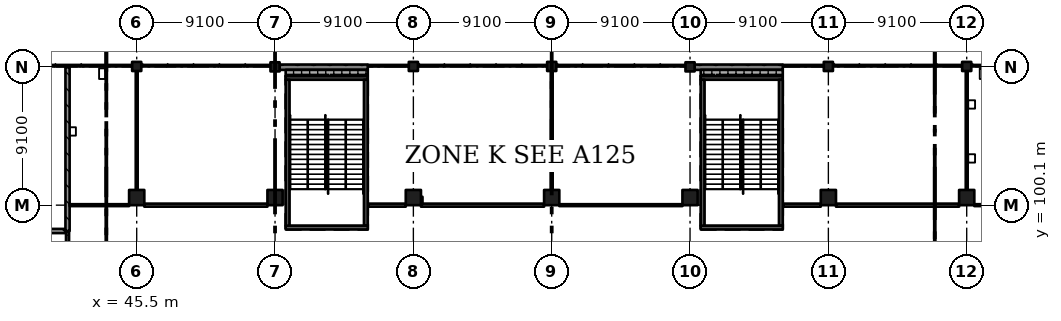
"""IFC4 building model, lengths in metres.
Left out: names, types, materials, properties, quantities, classifications, styles, units other than length and angle.
Written with IfcOpenShell. Run it as: python <this file> out.ifc"""

import sys

from ifc_helpers import new_model, si_unit, direction, frame, frame_2d, origin, origin_2d, place, context, subcontext, project, spatial, rectangle, extrude, element, fill, save


model = new_model("IFC4")
c1 = context("Model", 3, precision=1e-05, world=origin(), true_north=direction((0.0, 1.0)))
c2 = subcontext(c1, "Body", "Model", "MODEL_VIEW")
j1 = project(units=[si_unit("LENGTHUNIT", "METRE"), si_unit("PLANEANGLEUNIT", "RADIAN")], contexts=[c1])
p1 = place(None, origin())
s1 = spatial("IfcSite", under=j1, at=p1, CompositionType="ELEMENT")
p2 = place(p1, origin())
s2 = spatial("IfcBuilding", under=s1, at=p2, CompositionType="ELEMENT")
p3 = place(p2, frame((0.0, 0.0, 6.37)))
s3 = spatial("IfcBuildingStorey", under=s2, at=p3, CompositionType="ELEMENT", Elevation=6.37)
p4 = place(p3, frame((45.5, 100.6, 0.0), z_axis=(0.0, 0.0, 1.0), x_axis=(1.0, 0.0, 0.0)))
e1 = element("IfcColumn", 1, at=p4, inside=s3, PredefinedType="COLUMN", context=c2, shape_type="SweptSolid", body=[
    extrude(rectangle(XDim=1.0, YDim=1.0, at=origin_2d()), origin(), (0.0, 0.0, 1.0), 4.55),
])
p5 = place(p3, frame((45.5, 109.225, 0.0), z_axis=(0.0, 0.0, 1.0), x_axis=(1.0, 0.0, 0.0)))
e2 = element("IfcColumn", 2, at=p5, inside=s3, PredefinedType="COLUMN", context=c2, shape_type="SweptSolid", body=[
    extrude(rectangle(XDim=0.6, YDim=0.6, at=origin_2d()), origin(), (0.0, 0.0, 1.0), 4.55),
])
p6 = place(p3, frame((54.6, 100.6, 0.0), z_axis=(0.0, 0.0, 1.0), x_axis=(1.0, 0.0, 0.0)))
e3 = element("IfcColumn", 3, at=p6, inside=s3, PredefinedType="COLUMN", context=c2, shape_type="SweptSolid", body=[
    extrude(rectangle(XDim=1.0, YDim=1.0, at=origin_2d()), origin(), (0.0, 0.0, 1.0), 4.55),
])
p7 = place(p3, frame((54.6, 109.2, 0.0), z_axis=(0.0, 0.0, 1.0), x_axis=(1.0, 0.0, 0.0)))
e4 = element("IfcColumn", 4, at=p7, inside=s3, PredefinedType="COLUMN", context=c2, shape_type="SweptSolid", body=[
    extrude(rectangle(XDim=0.6, YDim=0.6, at=origin_2d()), origin(), (0.0, 0.0, 1.0), 4.55),
])
p8 = place(p3, frame((63.7, 100.6, 0.0), z_axis=(0.0, 0.0, 1.0), x_axis=(1.0, 0.0, 0.0)))
e5 = element("IfcColumn", 5, at=p8, inside=s3, PredefinedType="COLUMN", context=c2, shape_type="SweptSolid", body=[
    extrude(rectangle(XDim=1.0, YDim=1.0, at=origin_2d()), origin(), (0.0, 0.0, 1.0), 4.55),
])
p9 = place(p3, frame((63.7, 109.225, 0.0), z_axis=(0.0, 0.0, 1.0), x_axis=(1.0, 0.0, 0.0)))
e6 = element("IfcColumn", 6, at=p9, inside=s3, PredefinedType="COLUMN", context=c2, shape_type="SweptSolid", body=[
    extrude(rectangle(XDim=0.6, YDim=0.6, at=origin_2d()), origin(), (0.0, 0.0, 1.0), 4.55),
])
p10 = place(p3, frame((72.8, 100.6, 0.0), z_axis=(0.0, 0.0, 1.0), x_axis=(1.0, 0.0, 0.0)))
e7 = element("IfcColumn", 7, at=p10, inside=s3, PredefinedType="COLUMN", context=c2, shape_type="SweptSolid", body=[
    extrude(rectangle(XDim=1.0, YDim=1.0, at=origin_2d()), origin(), (0.0, 0.0, 1.0), 4.55),
])
p11 = place(p3, frame((72.8, 109.225, 0.0), z_axis=(0.0, 0.0, 1.0), x_axis=(1.0, 0.0, 0.0)))
e8 = element("IfcColumn", 8, at=p11, inside=s3, PredefinedType="COLUMN", context=c2, shape_type="SweptSolid", body=[
    extrude(rectangle(XDim=0.6, YDim=0.6, at=origin_2d()), origin(), (0.0, 0.0, 1.0), 4.55),
])
p12 = place(p3, frame((81.9, 100.6, 0.0), z_axis=(0.0, 0.0, 1.0), x_axis=(1.0, 0.0, 0.0)))
e9 = element("IfcColumn", 9, at=p12, inside=s3, PredefinedType="COLUMN", context=c2, shape_type="SweptSolid", body=[
    extrude(rectangle(XDim=1.0, YDim=1.0, at=origin_2d()), origin(), (0.0, 0.0, 1.0), 4.55),
])
p13 = place(p3, frame((81.9, 109.2, 0.0), z_axis=(0.0, 0.0, 1.0), x_axis=(1.0, 0.0, 0.0)))
e10 = element("IfcColumn", 10, at=p13, inside=s3, PredefinedType="COLUMN", context=c2, shape_type="SweptSolid", body=[
    extrude(rectangle(XDim=0.6, YDim=0.6, at=origin_2d()), origin(), (0.0, 0.0, 1.0), 4.55),
])
p14 = place(p3, frame((91.0, 100.6, 0.0), z_axis=(0.0, 0.0, 1.0), x_axis=(1.0, 0.0, 0.0)))
e11 = element("IfcColumn", 11, at=p14, inside=s3, PredefinedType="COLUMN", context=c2, shape_type="SweptSolid", body=[
    extrude(rectangle(XDim=1.0, YDim=1.0, at=origin_2d()), origin(), (0.0, 0.0, 1.0), 4.55),
])
p15 = place(p3, frame((91.0, 109.225, 0.0), z_axis=(0.0, 0.0, 1.0), x_axis=(1.0, 0.0, 0.0)))
e12 = element("IfcColumn", 12, at=p15, inside=s3, PredefinedType="COLUMN", context=c2, shape_type="SweptSolid", body=[
    extrude(rectangle(XDim=0.6, YDim=0.6, at=origin_2d()), origin(), (0.0, 0.0, 1.0), 4.55),
])
p16 = place(p3, frame((100.1, 100.6, 0.0), z_axis=(0.0, 0.0, 1.0), x_axis=(1.0, 0.0, 0.0)))
e13 = element("IfcColumn", 13, at=p16, inside=s3, PredefinedType="COLUMN", context=c2, shape_type="SweptSolid", body=[
    extrude(rectangle(XDim=1.0, YDim=1.0, at=origin_2d()), origin(), (0.0, 0.0, 1.0), 4.55),
])
p17 = place(p3, frame((100.1, 109.225, 0.0), z_axis=(0.0, 0.0, 1.0), x_axis=(1.0, 0.0, 0.0)))
e14 = element("IfcColumn", 14, at=p17, inside=s3, PredefinedType="COLUMN", context=c2, shape_type="SweptSolid", body=[
    extrude(rectangle(XDim=0.6, YDim=0.6, at=origin_2d()), origin(), (0.0, 0.0, 1.0), 4.55),
])
p18 = place(p3, frame((60.7, 98.625, 0.0), z_axis=(0.0, 0.0, 1.0), x_axis=(-1.0, 0.0, 0.0)))
e15 = element("IfcWall", 15, at=p18, inside=s3, PredefinedType="SHEAR", context=c2, shape_type="SweptSolid", body=[
    extrude(rectangle(XDim=5.4, YDim=0.25, at=frame_2d((2.7, 0.0))), origin(), (0.0, 0.0, 1.0), 4.55),
])
p19 = place(p18, frame((1.5, 0.0, 0.0)))
e16 = element("IfcOpeningElement", 16, at=p19, cuts=e15, PredefinedType="OPENING", context=c2, shape_type="SweptSolid", body=[
    extrude(rectangle(XDim=2.4, YDim=2.1, at=frame_2d((1.2, 1.05))), frame((0.0, 0.135, 0.0), z_axis=(0.0, -1.0, 0.0), x_axis=(1.0, 0.0, 0.0)), (0.0, 0.0, 1.0), 0.27),
])
p20 = place(p3, frame((60.7, 108.475, 0.0), z_axis=(0.0, 0.0, 1.0), x_axis=(-1.0, 0.0, 0.0)))
e17 = element("IfcWall", 17, at=p20, inside=s3, PredefinedType="SHEAR", context=c2, shape_type="SweptSolid", body=[
    extrude(rectangle(XDim=5.4, YDim=0.25, at=frame_2d((2.7, 0.0))), origin(), (0.0, 0.0, 1.0), 4.55),
])
for number, where, z_axis, x_axis in (
    (18, (55.425, 108.35, 0.0), (0.0, 0.0, 1.0), (0.0, -1.0, 0.0)),
    (19, (60.575, 108.35, 0.0), (0.0, 0.0, 1.0), (0.0, -1.0, 0.0)),
):
    element("IfcWall", number, at=place(p3, frame(where, z_axis=z_axis, x_axis=x_axis)), inside=s3, PredefinedType="SHEAR", context=c2, shape_type="SweptSolid", body=[
        extrude(rectangle(XDim=9.6, YDim=0.25, at=frame_2d((4.8, 0.0))), origin(), (0.0, 0.0, 1.0), 4.55),
    ])
p21 = place(p3, frame((88.0, 98.625, 0.0), z_axis=(0.0, 0.0, 1.0), x_axis=(-1.0, 0.0, 0.0)))
e20 = element("IfcWall", 20, at=p21, inside=s3, PredefinedType="SHEAR", context=c2, shape_type="SweptSolid", body=[
    extrude(rectangle(XDim=5.4, YDim=0.25, at=frame_2d((2.7, 0.0))), origin(), (0.0, 0.0, 1.0), 4.55),
])
p22 = place(p21, frame((1.5, 0.0, 0.0)))
e21 = element("IfcOpeningElement", 21, at=p22, cuts=e20, PredefinedType="OPENING", context=c2, shape_type="SweptSolid", body=[
    extrude(rectangle(XDim=2.4, YDim=2.1, at=frame_2d((1.2, 1.05))), frame((0.0, 0.135, 0.0), z_axis=(0.0, -1.0, 0.0), x_axis=(1.0, 0.0, 0.0)), (0.0, 0.0, 1.0), 0.27),
])
p23 = place(p3, frame((88.0, 108.475, 0.0), z_axis=(0.0, 0.0, 1.0), x_axis=(-1.0, 0.0, 0.0)))
e22 = element("IfcWall", 22, at=p23, inside=s3, PredefinedType="SHEAR", context=c2, shape_type="SweptSolid", body=[
    extrude(rectangle(XDim=5.4, YDim=0.25, at=frame_2d((2.7, 0.0))), origin(), (0.0, 0.0, 1.0), 4.55),
])
for number, where, z_axis, x_axis in (
    (23, (82.725, 108.35, 0.0), (0.0, 0.0, 1.0), (0.0, -1.0, 0.0)),
    (24, (87.875, 108.35, 0.0), (0.0, 0.0, 1.0), (0.0, -1.0, 0.0)),
):
    element("IfcWall", number, at=place(p3, frame(where, z_axis=z_axis, x_axis=x_axis)), inside=s3, PredefinedType="SHEAR", context=c2, shape_type="SweptSolid", body=[
        extrude(rectangle(XDim=9.6, YDim=0.25, at=frame_2d((4.8, 0.0))), origin(), (0.0, 0.0, 1.0), 4.55),
    ])
for number, where, z_axis, x_axis in (
    (25, (88.0, 109.175, 0.0), (0.0, 0.0, 1.0), (-1.0, 0.0, 0.0)),
    (26, (60.7, 109.175, 0.0), (0.0, 0.0, 1.0), (-1.0, 0.0, 0.0)),
):
    element("IfcWall", number, at=place(p3, frame(where, z_axis=z_axis, x_axis=x_axis)), inside=s3, PredefinedType="SOLIDWALL", context=c2, shape_type="SweptSolid", body=[
        extrude(rectangle(XDim=5.8, YDim=0.35, at=frame_2d((2.9, 0.0))), origin(), (0.0, 0.0, 1.0), 3.5),
    ])
for number, where, z_axis, x_axis in (
    (27, (55.3, 108.8, 0.0), (0.0, 0.0, 1.0), (1.0, 0.0, 0.0)),
    (28, (82.6, 108.8, 0.0), (0.0, 0.0, 1.0), (1.0, 0.0, 0.0)),
):
    element("IfcWall", number, at=place(p3, frame(where, z_axis=z_axis, x_axis=x_axis)), inside=s3, PredefinedType="SOLIDWALL", context=c2, shape_type="SweptSolid", body=[
        extrude(rectangle(XDim=5.4, YDim=0.4, at=frame_2d((2.7, 0.0))), origin(), (0.0, 0.0, 1.0), 4.25),
    ])
p24 = place(p3, frame((36.825, 98.4, 0.0), z_axis=(0.0, 0.0, 1.0), x_axis=(1.0, 0.0, 0.0)))
e29 = element("IfcWall", 29, at=p24, inside=s3, PredefinedType="SOLIDWALL", context=c2, shape_type="SweptSolid", body=[
    extrude(rectangle(XDim=3.988, YDim=0.275, at=frame_2d((1.994, 0.0))), origin(), (0.0, 0.0, 1.0), 4.25),
])
p25 = place(p24, frame((1.35, 0.0, 0.0)))
e30 = element("IfcOpeningElement", 30, at=p25, cuts=e29, PredefinedType="OPENING", context=c2, shape_type="SweptSolid", body=[
    extrude(rectangle(XDim=1.2, YDim=2.4, at=frame_2d((0.6, 1.2))), frame((0.0, 0.147, 0.0), z_axis=(0.0, -1.0, 0.0), x_axis=(1.0, 0.0, 0.0)), (0.0, 0.0, 1.0), 0.295),
])
p26 = place(p3, frame((40.95, 98.4, 0.0), z_axis=(0.0, 0.0, 1.0), x_axis=(0.0, -1.0, 0.0)))
e31 = element("IfcWall", 31, at=p26, inside=s3, PredefinedType="PARTITIONING", context=c2, shape_type="SweptSolid", body=[
    extrude(rectangle(XDim=7.37, YDim=0.2, at=frame_2d((3.685, 0.0))), origin(), (0.0, 0.0, 1.0), 4.25),
])
p27 = place(p26, frame((0.95, 0.0, 0.0)))
e32 = element("IfcOpeningElement", 32, at=p27, cuts=e31, PredefinedType="OPENING", context=c2, shape_type="SweptSolid", body=[
    extrude(rectangle(XDim=1.8, YDim=2.4, at=frame_2d((0.9, 1.2))), frame((0.0, 0.11, 0.0), z_axis=(0.0, -1.0, 0.0), x_axis=(1.0, 0.0, 0.0)), (0.0, 0.0, 1.0), 0.22),
])
p28 = place(p26, frame((4.65, 0.0, 0.0)))
e33 = element("IfcOpeningElement", 33, at=p28, cuts=e31, PredefinedType="OPENING", context=c2, shape_type="SweptSolid", body=[
    extrude(rectangle(XDim=1.8, YDim=2.4, at=frame_2d((0.9, 1.2))), frame((0.0, 0.11, 0.0), z_axis=(0.0, -1.0, 0.0), x_axis=(1.0, 0.0, 0.0)), (0.0, 0.0, 1.0), 0.22),
])
p29 = place(p3, frame((40.95, 98.4, 0.0), z_axis=(0.0, 0.0, 1.0), x_axis=(0.0, 1.0, 0.0)))
e34 = element("IfcWall", 34, at=p29, inside=s3, PredefinedType="SOLIDWALL", context=c2, shape_type="SweptSolid", body=[
    extrude(rectangle(XDim=10.77, YDim=0.275, at=frame_2d((5.385, 0.0))), origin(), (0.0, 0.0, 1.0), 4.25),
])
p30 = place(p3, frame((41.087, 100.1, 0.0), z_axis=(0.0, 0.0, 1.0), x_axis=(1.0, 0.0, 0.0)))
e35 = element("IfcWall", 35, at=p30, inside=s3, PredefinedType="PARTITIONING", context=c2, shape_type="SweptSolid", body=[
    extrude(rectangle(XDim=3.913, YDim=0.125, at=frame_2d((1.956, 0.0))), origin(), (0.0, 0.0, 1.0), 3.55),
])
p31 = place(p30, frame((1.45, 0.0, 0.0)))
e36 = element("IfcOpeningElement", 36, at=p31, cuts=e35, PredefinedType="OPENING", context=c2, shape_type="SweptSolid", body=[
    extrude(rectangle(XDim=1.0, YDim=2.1, at=frame_2d((0.5, 1.05))), frame((0.0, 0.073, 0.0), z_axis=(0.0, -1.0, 0.0), x_axis=(1.0, 0.0, 0.0)), (0.0, 0.0, 1.0), 0.145),
])
p32 = place(p3, frame((45.5, 108.925, 0.0), z_axis=(0.0, 0.0, 1.0), x_axis=(0.0, -1.0, 0.0)))
e37 = element("IfcWall", 37, at=p32, inside=s3, PredefinedType="PARTITIONING", context=c2, shape_type="SweptSolid", body=[
    extrude(rectangle(XDim=7.825, YDim=0.125, at=frame_2d((3.913, 0.0))), origin(), (0.0, 0.0, 1.0), 3.55),
])
p33 = place(p3, frame((46.0, 100.1, 0.0), z_axis=(0.0, 0.0, 1.0), x_axis=(1.0, 0.0, 0.0)))
e38 = element("IfcWall", 38, at=p33, inside=s3, PredefinedType="PARTITIONING", context=c2, shape_type="SweptSolid", body=[
    extrude(rectangle(XDim=8.1, YDim=0.2, at=frame_2d((4.05, 0.0))), origin(), (0.0, 0.0, 1.0), 3.55),
])
p34 = place(p33, frame((3.15, 0.0, 0.0)))
e39 = element("IfcOpeningElement", 39, at=p34, cuts=e38, PredefinedType="OPENING", context=c2, shape_type="SweptSolid", body=[
    extrude(rectangle(XDim=1.8, YDim=2.1, at=frame_2d((0.9, 1.05))), frame((0.0, 0.11, 0.0), z_axis=(0.0, -1.0, 0.0), x_axis=(1.0, 0.0, 0.0)), (0.0, 0.0, 1.0), 0.22),
])
p35 = place(p3, frame((60.73, 100.1, 0.0), z_axis=(0.0, 0.0, 1.0), x_axis=(1.0, 0.0, 0.0)))
e40 = element("IfcWall", 40, at=p35, inside=s3, PredefinedType="PARTITIONING", context=c2, shape_type="SweptSolid", body=[
    extrude(rectangle(XDim=2.47, YDim=0.2, at=frame_2d((1.235, 0.0))), origin(), (0.0, 0.0, 1.0), 3.8),
])
p36 = place(p3, frame((64.2, 100.1, 0.0), z_axis=(0.0, 0.0, 1.0), x_axis=(1.0, 0.0, 0.0)))
e41 = element("IfcWall", 41, at=p36, inside=s3, PredefinedType="PARTITIONING", context=c2, shape_type="SweptSolid", body=[
    extrude(rectangle(XDim=8.1, YDim=0.2, at=frame_2d((4.05, 0.0))), origin(), (0.0, 0.0, 1.0), 3.55),
])
p37 = place(p36, frame((3.15, 0.0, 0.0)))
e42 = element("IfcOpeningElement", 42, at=p37, cuts=e41, PredefinedType="OPENING", context=c2, shape_type="SweptSolid", body=[
    extrude(rectangle(XDim=1.8, YDim=2.1, at=frame_2d((0.9, 1.05))), frame((0.0, 0.11, 0.0), z_axis=(0.0, -1.0, 0.0), x_axis=(1.0, 0.0, 0.0)), (0.0, 0.0, 1.0), 0.22),
])
p38 = place(p3, frame((64.2, 100.65, 0.0), z_axis=(0.0, 0.0, 1.0), x_axis=(0.0, -1.0, 0.0)))
e43 = element("IfcWall", 43, at=p38, inside=s3, PredefinedType="PARTITIONING", context=c2, shape_type="SweptSolid", body=[
    extrude(rectangle(XDim=0.5, YDim=0.2, at=frame_2d((0.25, 0.0))), origin(), (0.0, 0.0, 1.0), 4.25),
])
p39 = place(p3, frame((72.8, 108.925, 0.0), z_axis=(0.0, 0.0, 1.0), x_axis=(0.0, -1.0, 0.0)))
e44 = element("IfcWall", 44, at=p39, inside=s3, PredefinedType="PARTITIONING", context=c2, shape_type="SweptSolid", body=[
    extrude(rectangle(XDim=7.825, YDim=0.125, at=frame_2d((3.913, 0.0))), origin(), (0.0, 0.0, 1.0), 3.55),
])
p40 = place(p3, frame((73.3, 100.1, 0.0), z_axis=(0.0, 0.0, 1.0), x_axis=(1.0, 0.0, 0.0)))
e45 = element("IfcWall", 45, at=p40, inside=s3, PredefinedType="PARTITIONING", context=c2, shape_type="SweptSolid", body=[
    extrude(rectangle(XDim=8.1, YDim=0.125, at=frame_2d((4.05, 0.0))), origin(), (0.0, 0.0, 1.0), 3.55),
])
p41 = place(p40, frame((3.65, 0.0, 0.0)))
e46 = element("IfcOpeningElement", 46, at=p41, cuts=e45, PredefinedType="OPENING", context=c2, shape_type="SweptSolid", body=[
    extrude(rectangle(XDim=0.9, YDim=2.1, at=frame_2d((0.45, 1.05))), frame((0.0, 0.073, 0.0), z_axis=(0.0, -1.0, 0.0), x_axis=(1.0, 0.0, 0.0)), (0.0, 0.0, 1.0), 0.145),
])
p42 = place(p3, frame((88.03, 100.1, 0.0), z_axis=(0.0, 0.0, 1.0), x_axis=(1.0, 0.0, 0.0)))
e47 = element("IfcWall", 47, at=p42, inside=s3, PredefinedType="PARTITIONING", context=c2, shape_type="SweptSolid", body=[
    extrude(rectangle(XDim=2.47, YDim=0.2, at=frame_2d((1.235, 0.0))), origin(), (0.0, 0.0, 1.0), 3.8),
])
p43 = place(p3, frame((91.5, 100.1, 0.0), z_axis=(0.0, 0.0, 1.0), x_axis=(1.0, 0.0, 0.0)))
e48 = element("IfcWall", 48, at=p43, inside=s3, PredefinedType="PARTITIONING", context=c2, shape_type="SweptSolid", body=[
    extrude(rectangle(XDim=8.1, YDim=0.2, at=frame_2d((4.05, 0.0))), origin(), (0.0, 0.0, 1.0), 3.55),
])
p44 = place(p43, frame((3.15, 0.0, 0.0)))
e49 = element("IfcOpeningElement", 49, at=p44, cuts=e48, PredefinedType="OPENING", context=c2, shape_type="SweptSolid", body=[
    extrude(rectangle(XDim=1.8, YDim=2.1, at=frame_2d((0.9, 1.05))), frame((0.0, 0.11, 0.0), z_axis=(0.0, -1.0, 0.0), x_axis=(1.0, 0.0, 0.0)), (0.0, 0.0, 1.0), 0.22),
])
p45 = place(p3, frame((100.1, 108.925, 0.0), z_axis=(0.0, 0.0, 1.0), x_axis=(0.0, -1.0, 0.0)))
e50 = element("IfcWall", 50, at=p45, inside=s3, PredefinedType="PARTITIONING", context=c2, shape_type="SweptSolid", body=[
    extrude(rectangle(XDim=7.825, YDim=0.125, at=frame_2d((3.913, 0.0))), origin(), (0.0, 0.0, 1.0), 3.55),
])
p46 = place(p3, frame((100.6, 100.1, 0.0), z_axis=(0.0, 0.0, 1.0), x_axis=(1.0, 0.0, 0.0)))
e51 = element("IfcWall", 51, at=p46, inside=s3, PredefinedType="PARTITIONING", context=c2, shape_type="SweptSolid", body=[
    extrude(rectangle(XDim=3.925, YDim=0.125, at=frame_2d((1.962, 0.0))), origin(), (0.0, 0.0, 1.0), 3.55),
])
p47 = place(p46, frame((1.55, 0.0, 0.0)))
e52 = element("IfcOpeningElement", 52, at=p47, cuts=e51, PredefinedType="OPENING", context=c2, shape_type="SweptSolid", body=[
    extrude(rectangle(XDim=0.9, YDim=2.1, at=frame_2d((0.45, 1.05))), frame((0.0, 0.073, 0.0), z_axis=(0.0, -1.0, 0.0), x_axis=(1.0, 0.0, 0.0)), (0.0, 0.0, 1.0), 0.145),
])
p48 = place(p31, origin())
e53 = element("IfcDoor", 53, at=p48, inside=s3, OperationType="SINGLE_SWING_RIGHT", PredefinedType="DOOR", context=c2, shape_type="SweptSolid", body=[
    extrude(rectangle(XDim=1.0, YDim=2.1, at=frame_2d((0.5, 1.05))), frame((0.0, 0.025, 0.0), z_axis=(0.0, -1.0, 0.0), x_axis=(1.0, 0.0, 0.0)), (0.0, 0.0, 1.0), 0.05),
])
fill(e36, e53)
p49 = place(p34, origin())
e54 = element("IfcDoor", 54, at=p49, inside=s3, OperationType="DOUBLE_DOOR_SINGLE_SWING", PredefinedType="DOOR", context=c2, shape_type="SweptSolid", body=[
    extrude(rectangle(XDim=1.8, YDim=2.1, at=frame_2d((0.9, 1.05))), frame((0.0, 0.025, 0.0), z_axis=(0.0, -1.0, 0.0), x_axis=(1.0, 0.0, 0.0)), (0.0, 0.0, 1.0), 0.05),
])
fill(e39, e54)
p50 = place(p37, origin())
e55 = element("IfcDoor", 55, at=p50, inside=s3, OperationType="DOUBLE_DOOR_SINGLE_SWING", PredefinedType="DOOR", context=c2, shape_type="SweptSolid", body=[
    extrude(rectangle(XDim=1.8, YDim=2.1, at=frame_2d((0.9, 1.05))), frame((0.0, 0.025, 0.0), z_axis=(0.0, -1.0, 0.0), x_axis=(1.0, 0.0, 0.0)), (0.0, 0.0, 1.0), 0.05),
])
fill(e42, e55)
p51 = place(p41, origin())
e56 = element("IfcDoor", 56, at=p51, inside=s3, OperationType="SINGLE_SWING_LEFT", PredefinedType="DOOR", context=c2, shape_type="SweptSolid", body=[
    extrude(rectangle(XDim=0.9, YDim=2.1, at=frame_2d((0.45, 1.05))), frame((0.0, 0.025, 0.0), z_axis=(0.0, -1.0, 0.0), x_axis=(1.0, 0.0, 0.0)), (0.0, 0.0, 1.0), 0.05),
])
fill(e46, e56)
p52 = place(p44, origin())
e57 = element("IfcDoor", 57, at=p52, inside=s3, OperationType="DOUBLE_DOOR_SINGLE_SWING", PredefinedType="DOOR", context=c2, shape_type="SweptSolid", body=[
    extrude(rectangle(XDim=1.8, YDim=2.1, at=frame_2d((0.9, 1.05))), frame((0.0, 0.025, 0.0), z_axis=(0.0, -1.0, 0.0), x_axis=(1.0, 0.0, 0.0)), (0.0, 0.0, 1.0), 0.05),
])
fill(e49, e57)
p53 = place(p19, origin())
e58 = element("IfcDoor", 58, at=p53, inside=s3, OperationType="DOUBLE_DOOR_SINGLE_SWING", PredefinedType="DOOR", context=c2, shape_type="SweptSolid", body=[
    extrude(rectangle(XDim=2.4, YDim=2.1, at=frame_2d((1.2, 1.05))), frame((0.0, 0.025, 0.0), z_axis=(0.0, -1.0, 0.0), x_axis=(1.0, 0.0, 0.0)), (0.0, 0.0, 1.0), 0.05),
])
fill(e16, e58)
p54 = place(p22, origin())
e59 = element("IfcDoor", 59, at=p54, inside=s3, OperationType="DOUBLE_DOOR_SINGLE_SWING", PredefinedType="DOOR", context=c2, shape_type="SweptSolid", body=[
    extrude(rectangle(XDim=2.4, YDim=2.1, at=frame_2d((1.2, 1.05))), frame((0.0, 0.025, 0.0), z_axis=(0.0, -1.0, 0.0), x_axis=(1.0, 0.0, 0.0)), (0.0, 0.0, 1.0), 0.05),
])
fill(e21, e59)
save(model, sys.argv[1])
